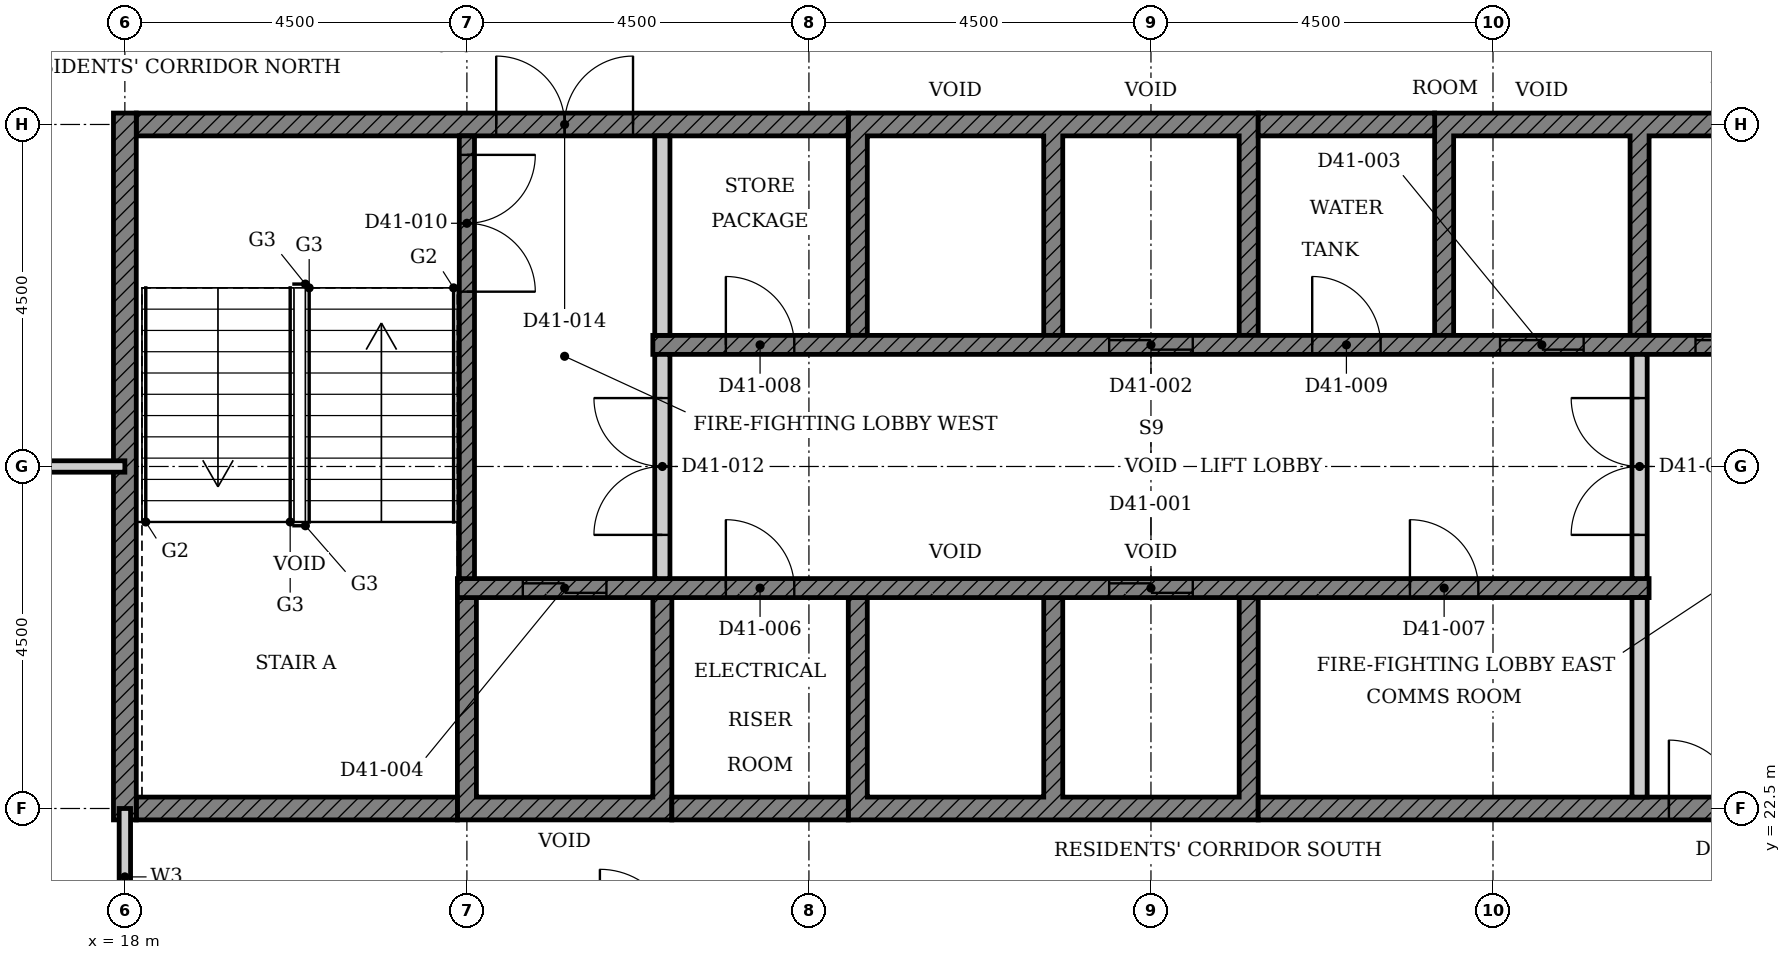
"""IFC4 building model, lengths in metres.
Left out: names, types, materials, properties, quantities, classifications, styles, units other than length and angle.
Written with IfcOpenShell. Run it as: python <this file> out.ifc"""

import sys

from ifc_helpers import new_model, si_unit, direction, frame, frame_2d, origin, place, context, subcontext, project, spatial, polyline, rectangle, outline, extrude, element, fill, save


model = new_model("IFC4")
c1 = context("Model", 3, precision=1e-05, world=origin(), true_north=direction((0.0, 1.0)))
c2 = subcontext(c1, "Body", "Model", "MODEL_VIEW")
j1 = project(units=[si_unit("LENGTHUNIT", "METRE"), si_unit("PLANEANGLEUNIT", "RADIAN")], contexts=[c1])
p1 = place(None, origin())
s1 = spatial("IfcSite", under=j1, at=p1, CompositionType="ELEMENT")
p2 = place(p1, origin())
s2 = spatial("IfcBuilding", under=s1, at=p2, CompositionType="ELEMENT")
p3 = place(p2, frame((0.0, 0.0, 165.4)))
s3 = spatial("IfcBuildingStorey", under=s2, at=p3, CompositionType="ELEMENT", Elevation=165.4)
p4 = place(p3, origin())
e1 = element("IfcWall", 1, at=p4, inside=s3, PredefinedType="SHEAR", context=c2, shape_type="SweptSolid", body=[
    extrude(outline(polyline([(22.375, 22.35), (25.197, 22.35), (25.197, 25.275), (24.947, 25.275), (24.947, 22.65), (22.625, 22.65), (22.625, 25.275), (22.375, 25.275), (22.375, 22.35)])), origin(), (0.0, 0.0, 1.0), 3.4),
])
p5 = place(p3, origin())
e2 = element("IfcWall", 2, at=p5, inside=s3, PredefinedType="SHEAR", context=c2, shape_type="SweptSolid", body=[
    extrude(outline(polyline([(27.518, 22.35), (32.911, 22.35), (32.911, 25.275), (32.661, 25.275), (32.661, 22.65), (30.339, 22.65), (30.339, 25.275), (30.089, 25.275), (30.089, 22.65), (27.768, 22.65), (27.768, 25.275), (27.518, 25.275), (27.518, 22.35)])), origin(), (0.0, 0.0, 1.0), 3.4),
])
p6 = place(p3, origin())
e3 = element("IfcWall", 3, at=p6, inside=s3, PredefinedType="SHEAR", context=c2, shape_type="SweptSolid", body=[
    extrude(outline(polyline([(27.518, 28.725), (27.768, 28.725), (27.768, 31.35), (30.089, 31.35), (30.089, 28.725), (30.339, 28.725), (30.339, 31.35), (32.661, 31.35), (32.661, 28.725), (32.911, 28.725), (32.911, 31.65), (27.518, 31.65), (27.518, 28.725)])), origin(), (0.0, 0.0, 1.0), 3.4),
])
p7 = place(p3, origin())
e4 = element("IfcWall", 4, at=p7, inside=s3, PredefinedType="SHEAR", context=c2, shape_type="SweptSolid", body=[
    extrude(outline(polyline([(35.232, 28.725), (35.482, 28.725), (35.482, 31.35), (37.803, 31.35), (37.803, 28.725), (38.053, 28.725), (38.053, 31.35), (40.375, 31.35), (40.375, 28.725), (40.625, 28.725), (40.625, 31.65), (35.232, 31.65), (35.232, 28.725)])), origin(), (0.0, 0.0, 1.0), 3.4),
])
p8 = place(p3, frame((18.15, 22.5, 0.0), z_axis=(0.0, 0.0, 1.0), x_axis=(1.0, 0.0, 0.0)))
e5 = element("IfcWall", 5, at=p8, inside=s3, PredefinedType="SHEAR", context=c2, shape_type="SweptSolid", body=[
    extrude(rectangle(XDim=4.225, YDim=0.3, at=frame_2d((2.113, 0.0))), origin(), (0.0, 0.0, 1.0), 3.4),
])
p9 = place(p3, frame((25.197, 22.5, 0.0), z_axis=(0.0, 0.0, 1.0), x_axis=(1.0, 0.0, 0.0)))
e6 = element("IfcWall", 6, at=p9, inside=s3, PredefinedType="SHEAR", context=c2, shape_type="SweptSolid", body=[
    extrude(rectangle(XDim=2.321, YDim=0.3, at=frame_2d((1.161, 0.0))), origin(), (0.0, 0.0, 1.0), 3.4),
])
p10 = place(p3, frame((32.911, 22.5, 0.0), z_axis=(0.0, 0.0, 1.0), x_axis=(1.0, 0.0, 0.0)))
e7 = element("IfcWall", 7, at=p10, inside=s3, PredefinedType="SHEAR", context=c2, shape_type="SweptSolid", body=[
    extrude(rectangle(XDim=11.939, YDim=0.3, at=frame_2d((5.97, 0.0))), origin(), (0.0, 0.0, 1.0), 3.4),
])
p11 = place(p10, frame((5.404, 0.0, 0.0)))
e8 = element("IfcOpeningElement", 8, at=p11, cuts=e7, PredefinedType="OPENING", context=c2, shape_type="SweptSolid", body=[
    extrude(rectangle(XDim=1.8, YDim=2.1, at=frame_2d((0.9, 1.05))), frame((0.0, 0.16, 0.0), z_axis=(0.0, -1.0, 0.0), x_axis=(1.0, 0.0, 0.0)), (0.0, 0.0, 1.0), 0.32),
])
p12 = place(p3, frame((18.15, 31.5, 0.0), z_axis=(0.0, 0.0, 1.0), x_axis=(1.0, 0.0, 0.0)))
e9 = element("IfcWall", 9, at=p12, inside=s3, PredefinedType="SHEAR", context=c2, shape_type="SweptSolid", body=[
    extrude(rectangle(XDim=9.368, YDim=0.3, at=frame_2d((4.684, 0.0))), origin(), (0.0, 0.0, 1.0), 3.4),
])
p13 = place(p12, frame((4.736, 0.0, 0.0)))
e10 = element("IfcOpeningElement", 10, at=p13, cuts=e9, PredefinedType="OPENING", context=c2, shape_type="SweptSolid", body=[
    extrude(rectangle(XDim=1.8, YDim=2.1, at=frame_2d((0.9, 1.05))), frame((0.0, 0.16, 0.0), z_axis=(0.0, -1.0, 0.0), x_axis=(1.0, 0.0, 0.0)), (0.0, 0.0, 1.0), 0.32),
])
p14 = place(p3, frame((32.911, 31.5, 0.0), z_axis=(0.0, 0.0, 1.0), x_axis=(1.0, 0.0, 0.0)))
e11 = element("IfcWall", 11, at=p14, inside=s3, PredefinedType="SHEAR", context=c2, shape_type="SweptSolid", body=[
    extrude(rectangle(XDim=2.322, YDim=0.3, at=frame_2d((1.161, 0.0))), origin(), (0.0, 0.0, 1.0), 3.4),
])
p15 = place(p3, frame((18.0, 22.35, 0.0), z_axis=(0.0, 0.0, 1.0), x_axis=(0.0, 1.0, 0.0)))
e12 = element("IfcWall", 12, at=p15, inside=s3, PredefinedType="SHEAR", context=c2, shape_type="SweptSolid", body=[
    extrude(rectangle(XDim=9.3, YDim=0.3, at=frame_2d((4.65, 0.0))), origin(), (0.0, 0.0, 1.0), 3.4),
])
p16 = place(p3, frame((22.375, 25.4, 0.0), z_axis=(0.0, 0.0, 1.0), x_axis=(1.0, 0.0, 0.0)))
e13 = element("IfcWall", 13, at=p16, inside=s3, PredefinedType="SHEAR", context=c2, shape_type="SweptSolid", body=[
    extrude(rectangle(XDim=15.678, YDim=0.25, at=frame_2d((7.839, 0.0))), origin(), (0.0, 0.0, 1.0), 3.4),
])
p17 = place(p16, frame((8.575, 0.0, 0.0)))
e14 = element("IfcOpeningElement", 14, at=p17, cuts=e13, PredefinedType="OPENING", context=c2, shape_type="SweptSolid", body=[
    extrude(rectangle(XDim=1.1, YDim=2.1, at=frame_2d((0.55, 1.05))), frame((0.0, 0.135, 0.0), z_axis=(0.0, -1.0, 0.0), x_axis=(1.0, 0.0, 0.0)), (0.0, 0.0, 1.0), 0.27),
])
p18 = place(p16, frame((0.861, 0.0, 0.0)))
e15 = element("IfcOpeningElement", 15, at=p18, cuts=e13, PredefinedType="OPENING", context=c2, shape_type="SweptSolid", body=[
    extrude(rectangle(XDim=1.1, YDim=2.1, at=frame_2d((0.55, 1.05))), frame((0.0, 0.135, 0.0), z_axis=(0.0, -1.0, 0.0), x_axis=(1.0, 0.0, 0.0)), (0.0, 0.0, 1.0), 0.27),
])
p19 = place(p16, frame((3.532, 0.0, 0.0)))
e16 = element("IfcOpeningElement", 16, at=p19, cuts=e13, PredefinedType="OPENING", context=c2, shape_type="SweptSolid", body=[
    extrude(rectangle(XDim=0.9, YDim=2.1, at=frame_2d((0.45, 1.05))), frame((0.0, 0.135, 0.0), z_axis=(0.0, -1.0, 0.0), x_axis=(1.0, 0.0, 0.0)), (0.0, 0.0, 1.0), 0.27),
])
p20 = place(p16, frame((12.532, 0.0, 0.0)))
e17 = element("IfcOpeningElement", 17, at=p20, cuts=e13, PredefinedType="OPENING", context=c2, shape_type="SweptSolid", body=[
    extrude(rectangle(XDim=0.9, YDim=2.1, at=frame_2d((0.45, 1.05))), frame((0.0, 0.135, 0.0), z_axis=(0.0, -1.0, 0.0), x_axis=(1.0, 0.0, 0.0)), (0.0, 0.0, 1.0), 0.27),
])
p21 = place(p3, frame((24.947, 28.6, 0.0), z_axis=(0.0, 0.0, 1.0), x_axis=(1.0, 0.0, 0.0)))
e18 = element("IfcWall", 18, at=p21, inside=s3, PredefinedType="SHEAR", context=c2, shape_type="SweptSolid", body=[
    extrude(rectangle(XDim=15.678, YDim=0.25, at=frame_2d((7.839, 0.0))), origin(), (0.0, 0.0, 1.0), 3.4),
])
p22 = place(p21, frame((6.004, 0.0, 0.0)))
e19 = element("IfcOpeningElement", 19, at=p22, cuts=e18, PredefinedType="OPENING", context=c2, shape_type="SweptSolid", body=[
    extrude(rectangle(XDim=1.1, YDim=2.1, at=frame_2d((0.55, 1.05))), frame((0.0, 0.135, 0.0), z_axis=(0.0, -1.0, 0.0), x_axis=(1.0, 0.0, 0.0)), (0.0, 0.0, 1.0), 0.27),
])
p23 = place(p21, frame((11.146, 0.0, 0.0)))
e20 = element("IfcOpeningElement", 20, at=p23, cuts=e18, PredefinedType="OPENING", context=c2, shape_type="SweptSolid", body=[
    extrude(rectangle(XDim=1.1, YDim=2.1, at=frame_2d((0.55, 1.05))), frame((0.0, 0.135, 0.0), z_axis=(0.0, -1.0, 0.0), x_axis=(1.0, 0.0, 0.0)), (0.0, 0.0, 1.0), 0.27),
])
p24 = place(p21, frame((13.718, 0.0, 0.0)))
e21 = element("IfcOpeningElement", 21, at=p24, cuts=e18, PredefinedType="OPENING", context=c2, shape_type="SweptSolid", body=[
    extrude(rectangle(XDim=1.1, YDim=2.1, at=frame_2d((0.55, 1.05))), frame((0.0, 0.135, 0.0), z_axis=(0.0, -1.0, 0.0), x_axis=(1.0, 0.0, 0.0)), (0.0, 0.0, 1.0), 0.27),
])
p25 = place(p21, frame((0.961, 0.0, 0.0)))
e22 = element("IfcOpeningElement", 22, at=p25, cuts=e18, PredefinedType="OPENING", context=c2, shape_type="SweptSolid", body=[
    extrude(rectangle(XDim=0.9, YDim=2.1, at=frame_2d((0.45, 1.05))), frame((0.0, 0.135, 0.0), z_axis=(0.0, -1.0, 0.0), x_axis=(1.0, 0.0, 0.0)), (0.0, 0.0, 1.0), 0.27),
])
p26 = place(p21, frame((8.675, 0.0, 0.0)))
e23 = element("IfcOpeningElement", 23, at=p26, cuts=e18, PredefinedType="OPENING", context=c2, shape_type="SweptSolid", body=[
    extrude(rectangle(XDim=0.9, YDim=2.1, at=frame_2d((0.45, 1.05))), frame((0.0, 0.135, 0.0), z_axis=(0.0, -1.0, 0.0), x_axis=(1.0, 0.0, 0.0)), (0.0, 0.0, 1.0), 0.27),
])
for number, where, z_axis, x_axis in (
    (24, (37.928, 22.65, 0.0), (0.0, 0.0, 1.0), (0.0, 1.0, 0.0)),
    (25, (25.072, 28.725, 0.0), (0.0, 0.0, 1.0), (0.0, 1.0, 0.0)),
):
    element("IfcWall", number, at=place(p3, frame(where, z_axis=z_axis, x_axis=x_axis)), inside=s3, PredefinedType="PARTITIONING", context=c2, shape_type="SweptSolid", body=[
        extrude(rectangle(XDim=2.625, YDim=0.2, at=frame_2d((1.312, 0.0))), origin(), (0.0, 0.0, 1.0), 3.4),
    ])
p27 = place(p3, frame((22.5, 31.35, 0.0), z_axis=(0.0, 0.0, 1.0), x_axis=(0.0, -1.0, 0.0)))
e26 = element("IfcWall", 26, at=p27, inside=s3, PredefinedType="SHEAR", context=c2, shape_type="SweptSolid", body=[
    extrude(rectangle(XDim=5.825, YDim=0.2, at=frame_2d((2.913, 0.0))), origin(), (0.0, 0.0, 1.0), 3.4),
])
p28 = place(p27, frame((0.25, 0.0, 0.0)))
e27 = element("IfcOpeningElement", 27, at=p28, cuts=e26, PredefinedType="OPENING", context=c2, shape_type="SweptSolid", body=[
    extrude(rectangle(XDim=1.8, YDim=2.1, at=frame_2d((0.9, 1.05))), frame((0.0, 0.11, 0.0), z_axis=(0.0, -1.0, 0.0), x_axis=(1.0, 0.0, 0.0)), (0.0, 0.0, 1.0), 0.22),
])
p29 = place(p3, frame((25.072, 25.525, 0.0), z_axis=(0.0, 0.0, 1.0), x_axis=(0.0, 1.0, 0.0)))
e28 = element("IfcWall", 28, at=p29, inside=s3, PredefinedType="PARTITIONING", context=c2, shape_type="SweptSolid", body=[
    extrude(rectangle(XDim=2.95, YDim=0.2, at=frame_2d((1.475, 0.0))), origin(), (0.0, 0.0, 1.0), 3.4),
])
p30 = place(p29, frame((0.575, 0.0, 0.0)))
e29 = element("IfcOpeningElement", 29, at=p30, cuts=e28, PredefinedType="OPENING", context=c2, shape_type="SweptSolid", body=[
    extrude(rectangle(XDim=1.8, YDim=2.1, at=frame_2d((0.9, 1.05))), frame((0.0, 0.11, 0.0), z_axis=(0.0, -1.0, 0.0), x_axis=(1.0, 0.0, 0.0)), (0.0, 0.0, 1.0), 0.22),
])
p31 = place(p3, frame((37.928, 25.525, 0.0), z_axis=(0.0, 0.0, 1.0), x_axis=(0.0, 1.0, 0.0)))
e30 = element("IfcWall", 30, at=p31, inside=s3, PredefinedType="PARTITIONING", context=c2, shape_type="SweptSolid", body=[
    extrude(rectangle(XDim=2.95, YDim=0.2, at=frame_2d((1.475, 0.0))), origin(), (0.0, 0.0, 1.0), 3.4),
])
p32 = place(p31, frame((0.575, 0.0, 0.0)))
e31 = element("IfcOpeningElement", 31, at=p32, cuts=e30, PredefinedType="OPENING", context=c2, shape_type="SweptSolid", body=[
    extrude(rectangle(XDim=1.8, YDim=2.1, at=frame_2d((0.9, 1.05))), frame((0.0, 0.11, 0.0), z_axis=(0.0, -1.0, 0.0), x_axis=(1.0, 0.0, 0.0)), (0.0, 0.0, 1.0), 0.22),
])
p33 = place(p3, frame((4.5, 27.0, 0.0), z_axis=(0.0, 0.0, 1.0), x_axis=(1.0, 0.0, 0.0)))
e32 = element("IfcWall", 32, at=p33, inside=s3, PredefinedType="PARTITIONING", context=c2, shape_type="SweptSolid", body=[
    extrude(rectangle(XDim=13.5, YDim=0.15, at=frame_2d((6.75, 0.0))), origin(), (0.0, 0.0, 1.0), 2.68),
])
p34 = place(p33, frame((5.35, 0.0, 0.0)))
e33 = element("IfcOpeningElement", 33, at=p34, cuts=e32, PredefinedType="OPENING", context=c2, shape_type="SweptSolid", body=[
    extrude(rectangle(XDim=1.0, YDim=2.1, at=frame_2d((0.5, 1.05))), frame((0.0, 0.085, 0.0), z_axis=(0.0, -1.0, 0.0), x_axis=(1.0, 0.0, 0.0)), (0.0, 0.0, 1.0), 0.17),
])
p35 = place(p3, frame((18.0, 20.7, 0.0), z_axis=(0.0, 0.0, 1.0), x_axis=(0.0, 1.0, 0.0)))
e34 = element("IfcWall", 34, at=p35, inside=s3, PredefinedType="PARTITIONING", context=c2, shape_type="SweptSolid", body=[
    extrude(rectangle(XDim=1.8, YDim=0.15, at=frame_2d((0.9, 0.0))), origin(), (0.0, 0.0, 1.0), 3.4),
])
p36 = place(p17, origin())
e35 = element("IfcDoor", 35, at=p36, inside=s3, OperationType="DOUBLE_DOOR_SLIDING", PredefinedType="DOOR", context=c2, shape_type="SweptSolid", body=[
    extrude(rectangle(XDim=1.1, YDim=2.1, at=frame_2d((0.55, 1.05))), frame((0.0, 0.025, 0.0), z_axis=(0.0, -1.0, 0.0), x_axis=(1.0, 0.0, 0.0)), (0.0, 0.0, 1.0), 0.05),
])
fill(e14, e35)
p37 = place(p22, origin())
e36 = element("IfcDoor", 36, at=p37, inside=s3, OperationType="DOUBLE_DOOR_SLIDING", PredefinedType="DOOR", context=c2, shape_type="SweptSolid", body=[
    extrude(rectangle(XDim=1.1, YDim=2.1, at=frame_2d((0.55, 1.05))), frame((0.0, 0.025, 0.0), z_axis=(0.0, -1.0, 0.0), x_axis=(1.0, 0.0, 0.0)), (0.0, 0.0, 1.0), 0.05),
])
fill(e19, e36)
p38 = place(p23, origin())
e37 = element("IfcDoor", 37, at=p38, inside=s3, OperationType="DOUBLE_DOOR_SLIDING", PredefinedType="DOOR", context=c2, shape_type="SweptSolid", body=[
    extrude(rectangle(XDim=1.1, YDim=2.1, at=frame_2d((0.55, 1.05))), frame((0.0, 0.025, 0.0), z_axis=(0.0, -1.0, 0.0), x_axis=(1.0, 0.0, 0.0)), (0.0, 0.0, 1.0), 0.05),
])
fill(e20, e37)
p39 = place(p18, origin())
e38 = element("IfcDoor", 38, at=p39, inside=s3, OperationType="DOUBLE_DOOR_SLIDING", PredefinedType="DOOR", context=c2, shape_type="SweptSolid", body=[
    extrude(rectangle(XDim=1.1, YDim=2.1, at=frame_2d((0.55, 1.05))), frame((0.0, 0.025, 0.0), z_axis=(0.0, -1.0, 0.0), x_axis=(1.0, 0.0, 0.0)), (0.0, 0.0, 1.0), 0.05),
])
fill(e15, e38)
p40 = place(p24, origin())
e39 = element("IfcDoor", 39, at=p40, inside=s3, OperationType="DOUBLE_DOOR_SLIDING", PredefinedType="DOOR", context=c2, shape_type="SweptSolid", body=[
    extrude(rectangle(XDim=1.1, YDim=2.1, at=frame_2d((0.55, 1.05))), frame((0.0, 0.025, 0.0), z_axis=(0.0, -1.0, 0.0), x_axis=(1.0, 0.0, 0.0)), (0.0, 0.0, 1.0), 0.05),
])
fill(e21, e39)
p41 = place(p19, origin())
e40 = element("IfcDoor", 40, at=p41, inside=s3, OperationType="SINGLE_SWING_LEFT", PredefinedType="DOOR", context=c2, shape_type="SweptSolid", body=[
    extrude(rectangle(XDim=0.9, YDim=2.1, at=frame_2d((0.45, 1.05))), frame((0.0, 0.025, 0.0), z_axis=(0.0, -1.0, 0.0), x_axis=(1.0, 0.0, 0.0)), (0.0, 0.0, 1.0), 0.05),
])
fill(e16, e40)
p42 = place(p20, origin())
e41 = element("IfcDoor", 41, at=p42, inside=s3, OperationType="SINGLE_SWING_LEFT", PredefinedType="DOOR", context=c2, shape_type="SweptSolid", body=[
    extrude(rectangle(XDim=0.9, YDim=2.1, at=frame_2d((0.45, 1.05))), frame((0.0, 0.025, 0.0), z_axis=(0.0, -1.0, 0.0), x_axis=(1.0, 0.0, 0.0)), (0.0, 0.0, 1.0), 0.05),
])
fill(e17, e41)
p43 = place(p25, origin())
e42 = element("IfcDoor", 42, at=p43, inside=s3, OperationType="SINGLE_SWING_LEFT", PredefinedType="DOOR", context=c2, shape_type="SweptSolid", body=[
    extrude(rectangle(XDim=0.9, YDim=2.1, at=frame_2d((0.45, 1.05))), frame((0.0, 0.025, 0.0), z_axis=(0.0, -1.0, 0.0), x_axis=(1.0, 0.0, 0.0)), (0.0, 0.0, 1.0), 0.05),
])
fill(e22, e42)
p44 = place(p26, origin())
e43 = element("IfcDoor", 43, at=p44, inside=s3, OperationType="SINGLE_SWING_LEFT", PredefinedType="DOOR", context=c2, shape_type="SweptSolid", body=[
    extrude(rectangle(XDim=0.9, YDim=2.1, at=frame_2d((0.45, 1.05))), frame((0.0, 0.025, 0.0), z_axis=(0.0, -1.0, 0.0), x_axis=(1.0, 0.0, 0.0)), (0.0, 0.0, 1.0), 0.05),
])
fill(e23, e43)
p45 = place(p28, origin())
e44 = element("IfcDoor", 44, at=p45, inside=s3, OperationType="DOUBLE_DOOR_SINGLE_SWING", PredefinedType="DOOR", context=c2, shape_type="SweptSolid", body=[
    extrude(rectangle(XDim=1.8, YDim=2.1, at=frame_2d((0.9, 1.05))), frame((0.0, 0.025, 0.0), z_axis=(0.0, -1.0, 0.0), x_axis=(1.0, 0.0, 0.0)), (0.0, 0.0, 1.0), 0.05),
])
fill(e27, e44)
p46 = place(p30, origin())
e45 = element("IfcDoor", 45, at=p46, inside=s3, OperationType="DOUBLE_DOOR_SINGLE_SWING", PredefinedType="DOOR", context=c2, shape_type="SweptSolid", body=[
    extrude(rectangle(XDim=1.8, YDim=2.1, at=frame_2d((0.9, 1.05))), frame((0.0, 0.025, 0.0), z_axis=(0.0, -1.0, 0.0), x_axis=(1.0, 0.0, 0.0)), (0.0, 0.0, 1.0), 0.05),
])
fill(e29, e45)
p47 = place(p32, origin())
e46 = element("IfcDoor", 46, at=p47, inside=s3, OperationType="DOUBLE_DOOR_SINGLE_SWING", PredefinedType="DOOR", context=c2, shape_type="SweptSolid", body=[
    extrude(rectangle(XDim=1.8, YDim=2.1, at=frame_2d((0.9, 1.05))), frame((0.0, 0.025, 0.0), z_axis=(0.0, -1.0, 0.0), x_axis=(1.0, 0.0, 0.0)), (0.0, 0.0, 1.0), 0.05),
])
fill(e31, e46)
p48 = place(p13, origin())
e47 = element("IfcDoor", 47, at=p48, inside=s3, OperationType="DOUBLE_DOOR_SINGLE_SWING", PredefinedType="DOOR", context=c2, shape_type="SweptSolid", body=[
    extrude(rectangle(XDim=1.8, YDim=2.1, at=frame_2d((0.9, 1.05))), frame((0.0, 0.025, 0.0), z_axis=(0.0, -1.0, 0.0), x_axis=(1.0, 0.0, 0.0)), (0.0, 0.0, 1.0), 0.05),
])
fill(e10, e47)
p49 = place(p11, origin())
e48 = element("IfcDoor", 48, at=p49, inside=s3, OperationType="DOUBLE_DOOR_SINGLE_SWING", PredefinedType="DOOR", context=c2, shape_type="SweptSolid", body=[
    extrude(rectangle(XDim=1.8, YDim=2.1, at=frame_2d((0.9, 1.05))), frame((0.0, 0.025, 0.0), z_axis=(0.0, -1.0, 0.0), x_axis=(1.0, 0.0, 0.0)), (0.0, 0.0, 1.0), 0.05),
])
fill(e8, e48)
save(model, sys.argv[1])
